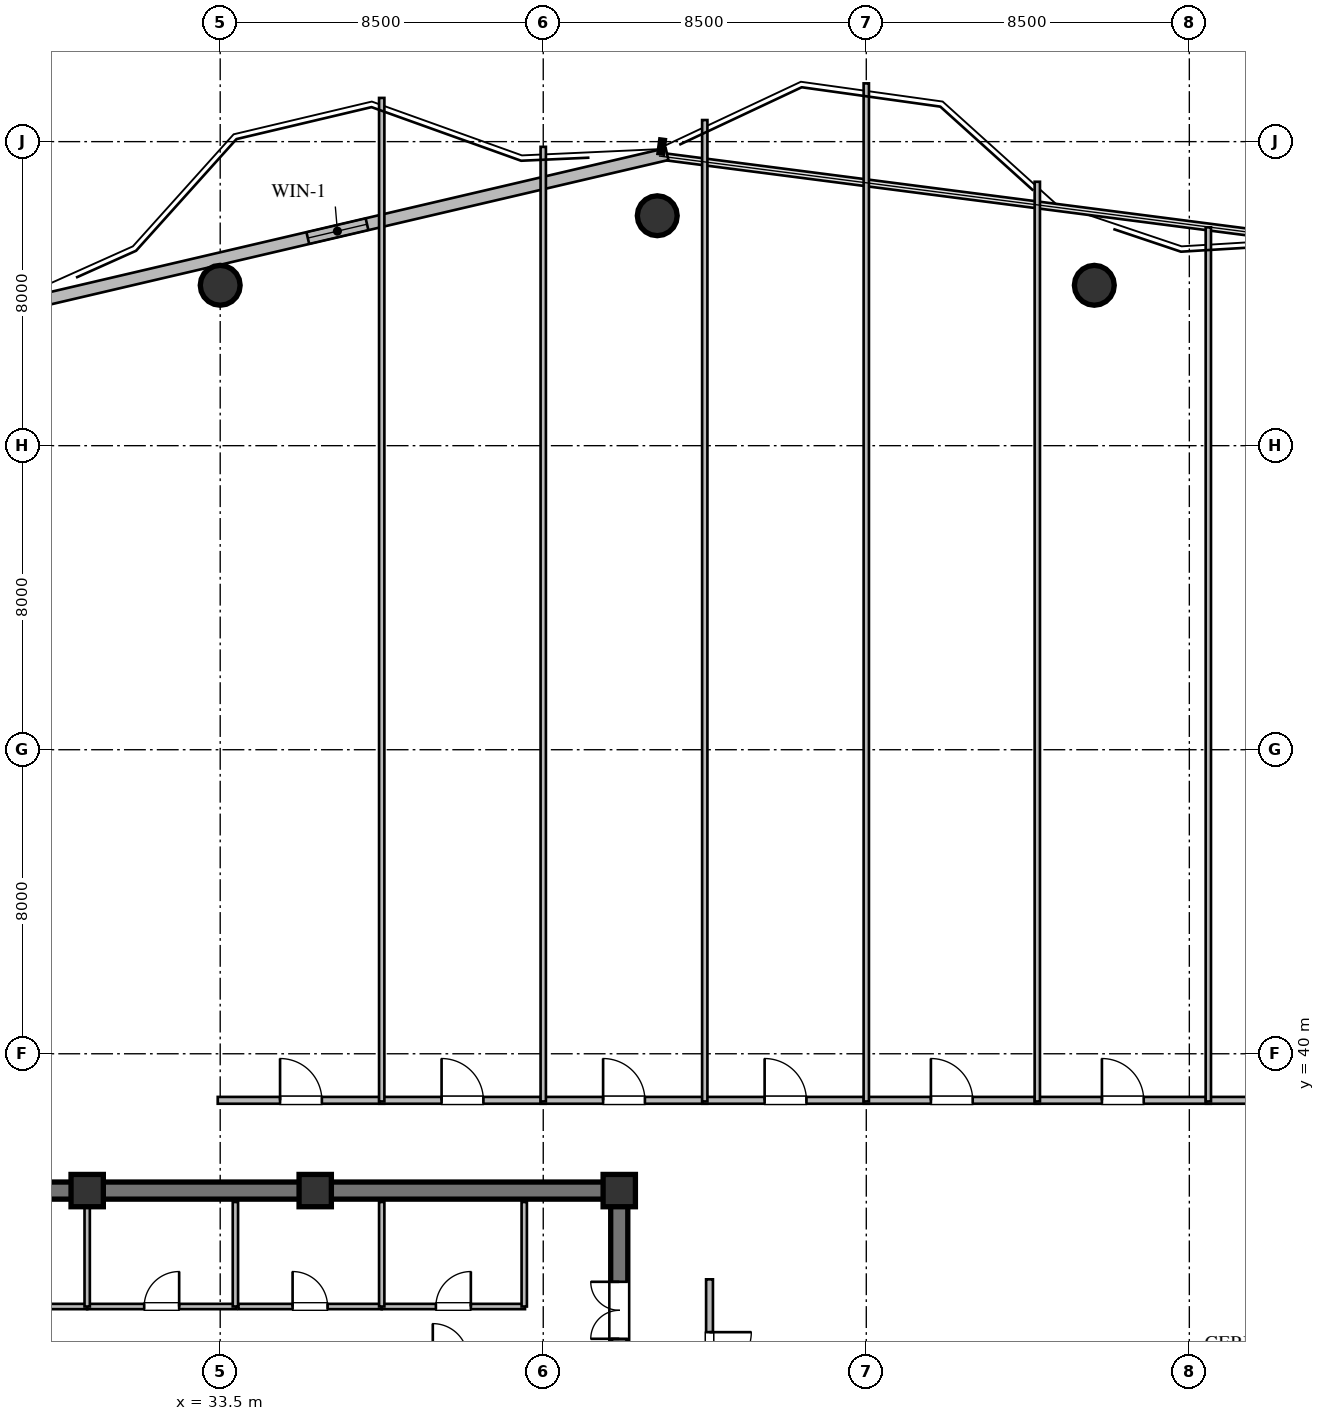
"""IFC4 building model, lengths in metres.
Left out: names, types, materials, properties, quantities, classifications, styles, units other than length and angle.
Written with IfcOpenShell. Run it as: python <this file> out.ifc"""

import sys

from ifc_helpers import new_model, si_unit, direction, frame, frame_2d, origin, origin_2d, place, context, subcontext, project, spatial, rectangle, circle, extrude, element, fill, save


model = new_model("IFC4")
c1 = context("Model", 3, precision=1e-05, world=origin(), true_north=direction((0.0, 1.0)))
c2 = subcontext(c1, "Body", "Model", "MODEL_VIEW")
j1 = project(units=[si_unit("LENGTHUNIT", "METRE"), si_unit("PLANEANGLEUNIT", "RADIAN")], contexts=[c1])
p1 = place(None, origin())
s1 = spatial("IfcSite", under=j1, at=p1, CompositionType="ELEMENT")
p2 = place(p1, origin())
s2 = spatial("IfcBuilding", under=s1, at=p2, CompositionType="ELEMENT")
p3 = place(p2, frame((0.0, 0.0, 220.8)))
s3 = spatial("IfcBuildingStorey", under=s2, at=p3, CompositionType="ELEMENT", Elevation=220.8)
p4 = place(p3, frame((21.775, 36.4, 0.0), z_axis=(0.0, 0.0, 1.0), x_axis=(1.0, 0.0, 0.0)))
e1 = element("IfcWall", 1, at=p4, inside=s3, PredefinedType="SHEAR", context=c2, shape_type="SweptSolid", body=[
    extrude(rectangle(XDim=22.45, YDim=0.45, at=frame_2d((11.225, 0.0))), origin(), (0.0, 0.0, 1.0), 3.36),
])
p5 = place(p3, frame((44.0, 23.825, 0.0), z_axis=(0.0, 0.0, 1.0), x_axis=(0.0, 1.0, 0.0)))
e2 = element("IfcWall", 2, at=p5, inside=s3, PredefinedType="SHEAR", context=c2, shape_type="SweptSolid", body=[
    extrude(rectangle(XDim=12.35, YDim=0.45, at=frame_2d((6.175, 0.0))), origin(), (0.0, 0.0, 1.0), 3.36),
])
p6 = place(p5, frame((8.675, 0.0, 0.0)))
e3 = element("IfcOpeningElement", 3, at=p6, cuts=e2, PredefinedType="OPENING", context=c2, shape_type="SweptSolid", body=[
    extrude(rectangle(XDim=1.5, YDim=2.15, at=frame_2d((0.75, 1.075))), frame((0.0, 0.235, 0.0), z_axis=(0.0, -1.0, 0.0), x_axis=(1.0, 0.0, 0.0)), (0.0, 0.0, 1.0), 0.47),
])
for number, where, z_axis, x_axis in (
    (4, (44.0, 36.4, 0.0), (0.0, 0.0, 1.0), (1.0, 0.0, 0.0)),
    (5, (36.0, 36.4, 0.0), (0.0, 0.0, 1.0), (1.0, 0.0, 0.0)),
    (6, (30.0, 36.4, 0.0), (0.0, 0.0, 1.0), (1.0, 0.0, 0.0)),
):
    element("IfcColumn", number, at=place(p3, frame(where, z_axis=z_axis, x_axis=x_axis)), inside=s3, PredefinedType="COLUMN", context=c2, shape_type="SweptSolid", body=[
        extrude(rectangle(XDim=0.85, YDim=0.85, at=origin_2d()), origin(), (0.0, 0.0, 1.0), 3.6),
    ])
for number, where, z_axis, x_axis in (
    (7, (56.5, 60.22, 0.0), (0.0, 0.0, 1.0), (1.0, 0.0, 0.0)),
    (8, (45.0, 62.05, 0.0), (0.0, 0.0, 1.0), (1.0, 0.0, 0.0)),
    (9, (33.5, 60.22, 0.0), (0.0, 0.0, 1.0), (1.0, 0.0, 0.0)),
):
    element("IfcColumn", number, at=place(p3, frame(where, z_axis=z_axis, x_axis=x_axis)), inside=s3, PredefinedType="COLUMN", context=c2, shape_type="SweptSolid", body=[
        extrude(circle(Radius=0.525, at=origin_2d()), origin(), (0.0, 0.0, 1.0), 3.6),
    ])
p7 = place(p3, frame((27.909, 59.617, 0.0), z_axis=(0.0, 0.0, 1.0), x_axis=(0.973753606594, 0.227604731158, 0.0)))
e10 = element("IfcWall", 10, at=p7, inside=s3, PredefinedType="STANDARD", context=c2, shape_type="SweptSolid", body=[
    extrude(rectangle(XDim=17.817, YDim=0.32, at=frame_2d((8.908, 0.0))), origin(), (0.0, 0.0, 1.0), 3.36),
])
p8 = place(p7, frame((8.109, 0.0, 1.05)))
e11 = element("IfcOpeningElement", 11, at=p8, cuts=e10, PredefinedType="OPENING", context=c2, shape_type="SweptSolid", body=[
    extrude(rectangle(XDim=1.6, YDim=1.5, at=frame_2d((0.8, 0.75))), frame((0.0, 0.17, 0.0), z_axis=(0.0, -1.0, 0.0), x_axis=(1.0, 0.0, 0.0)), (0.0, 0.0, 1.0), 0.34),
])
p9 = place(p3, frame((26.05, 33.35, 0.0), z_axis=(0.0, 0.0, 1.0), x_axis=(1.0, 0.0, 0.0)))
e12 = element("IfcWall", 12, at=p9, inside=s3, PredefinedType="PARTITIONING", context=c2, shape_type="SweptSolid", body=[
    extrude(rectangle(XDim=3.95, YDim=0.14, at=frame_2d((1.975, 0.0))), origin(), (0.0, 0.0, 1.0), 3.36),
])
p10 = place(p9, frame((1.515, 0.0, 0.0)))
e13 = element("IfcOpeningElement", 13, at=p10, cuts=e12, PredefinedType="OPENING", context=c2, shape_type="SweptSolid", body=[
    extrude(rectangle(XDim=0.92, YDim=2.1, at=frame_2d((0.46, 1.05))), frame((0.0, 0.08, 0.0), z_axis=(0.0, -1.0, 0.0), x_axis=(1.0, 0.0, 0.0)), (0.0, 0.0, 1.0), 0.16),
])
p11 = place(p3, frame((30.0, 33.35, 0.0), z_axis=(0.0, 0.0, 1.0), x_axis=(1.0, 0.0, 0.0)))
e14 = element("IfcWall", 14, at=p11, inside=s3, PredefinedType="PARTITIONING", context=c2, shape_type="SweptSolid", body=[
    extrude(rectangle(XDim=3.92, YDim=0.14, at=frame_2d((1.96, 0.0))), origin(), (0.0, 0.0, 1.0), 3.36),
])
p12 = place(p11, frame((1.5, 0.0, 0.0)))
e15 = element("IfcOpeningElement", 15, at=p12, cuts=e14, PredefinedType="OPENING", context=c2, shape_type="SweptSolid", body=[
    extrude(rectangle(XDim=0.92, YDim=2.1, at=frame_2d((0.46, 1.05))), frame((0.0, 0.08, 0.0), z_axis=(0.0, -1.0, 0.0), x_axis=(1.0, 0.0, 0.0)), (0.0, 0.0, 1.0), 0.16),
])
for number, where, z_axis, x_axis in (
    (16, (30.0, 33.35, 0.0), (0.0, 0.0, 1.0), (0.0, 1.0, 0.0)),
    (17, (33.9, 33.35, 0.0), (0.0, 0.0, 1.0), (0.0, 1.0, 0.0)),
):
    element("IfcWall", number, at=place(p3, frame(where, z_axis=z_axis, x_axis=x_axis)), inside=s3, PredefinedType="PARTITIONING", context=c2, shape_type="SweptSolid", body=[
        extrude(rectangle(XDim=2.75, YDim=0.14, at=frame_2d((1.375, 0.0))), origin(), (0.0, 0.0, 1.0), 3.36),
    ])
p13 = place(p3, frame((33.98, 33.35, 0.0), z_axis=(0.0, 0.0, 1.0), x_axis=(1.0, 0.0, 0.0)))
e18 = element("IfcWall", 18, at=p13, inside=s3, PredefinedType="PARTITIONING", context=c2, shape_type="SweptSolid", body=[
    extrude(rectangle(XDim=3.77, YDim=0.14, at=frame_2d((1.885, 0.0))), origin(), (0.0, 0.0, 1.0), 3.36),
])
p14 = place(p13, frame((1.425, 0.0, 0.0)))
e19 = element("IfcOpeningElement", 19, at=p14, cuts=e18, PredefinedType="OPENING", context=c2, shape_type="SweptSolid", body=[
    extrude(rectangle(XDim=0.92, YDim=2.1, at=frame_2d((0.46, 1.05))), frame((0.0, 0.08, 0.0), z_axis=(0.0, -1.0, 0.0), x_axis=(1.0, 0.0, 0.0)), (0.0, 0.0, 1.0), 0.16),
])
p15 = place(p3, frame((37.75, 33.35, 0.0), z_axis=(0.0, 0.0, 1.0), x_axis=(1.0, 0.0, 0.0)))
e20 = element("IfcWall", 20, at=p15, inside=s3, PredefinedType="PARTITIONING", context=c2, shape_type="SweptSolid", body=[
    extrude(rectangle(XDim=3.77, YDim=0.14, at=frame_2d((1.885, 0.0))), origin(), (0.0, 0.0, 1.0), 3.36),
])
p16 = place(p15, frame((1.425, 0.0, 0.0)))
e21 = element("IfcOpeningElement", 21, at=p16, cuts=e20, PredefinedType="OPENING", context=c2, shape_type="SweptSolid", body=[
    extrude(rectangle(XDim=0.92, YDim=2.1, at=frame_2d((0.46, 1.05))), frame((0.0, 0.08, 0.0), z_axis=(0.0, -1.0, 0.0), x_axis=(1.0, 0.0, 0.0)), (0.0, 0.0, 1.0), 0.16),
])
for number, where, z_axis, x_axis in (
    (22, (37.75, 33.35, 0.0), (0.0, 0.0, 1.0), (0.0, 1.0, 0.0)),
    (23, (41.5, 33.35, 0.0), (0.0, 0.0, 1.0), (0.0, 1.0, 0.0)),
):
    element("IfcWall", number, at=place(p3, frame(where, z_axis=z_axis, x_axis=x_axis)), inside=s3, PredefinedType="PARTITIONING", context=c2, shape_type="SweptSolid", body=[
        extrude(rectangle(XDim=2.75, YDim=0.14, at=frame_2d((1.375, 0.0))), origin(), (0.0, 0.0, 1.0), 3.36),
    ])
p17 = place(p3, frame((33.435, 38.775, 0.0), z_axis=(0.0, 0.0, 1.0), x_axis=(1.0, 0.0, 0.0)))
e24 = element("IfcWall", 24, at=p17, inside=s3, PredefinedType="PARTITIONING", context=c2, shape_type="SweptSolid", body=[
    extrude(rectangle(XDim=4.38, YDim=0.18, at=frame_2d((2.19, 0.0))), origin(), (0.0, 0.0, 1.0), 3.36),
])
p18 = place(p17, frame((1.64, 0.0, 0.0)))
e25 = element("IfcOpeningElement", 25, at=p18, cuts=e24, PredefinedType="OPENING", context=c2, shape_type="SweptSolid", body=[
    extrude(rectangle(XDim=1.1, YDim=2.1, at=frame_2d((0.55, 1.05))), frame((0.0, 0.1, 0.0), z_axis=(0.0, -1.0, 0.0), x_axis=(1.0, 0.0, 0.0)), (0.0, 0.0, 1.0), 0.2),
])
p19 = place(p3, frame((37.685, 38.775, 0.0), z_axis=(0.0, 0.0, 1.0), x_axis=(1.0, 0.0, 0.0)))
e26 = element("IfcWall", 26, at=p19, inside=s3, PredefinedType="PARTITIONING", context=c2, shape_type="SweptSolid", body=[
    extrude(rectangle(XDim=4.38, YDim=0.18, at=frame_2d((2.19, 0.0))), origin(), (0.0, 0.0, 1.0), 3.36),
])
p20 = place(p19, frame((1.64, 0.0, 0.0)))
e27 = element("IfcOpeningElement", 27, at=p20, cuts=e26, PredefinedType="OPENING", context=c2, shape_type="SweptSolid", body=[
    extrude(rectangle(XDim=1.1, YDim=2.1, at=frame_2d((0.55, 1.05))), frame((0.0, 0.1, 0.0), z_axis=(0.0, -1.0, 0.0), x_axis=(1.0, 0.0, 0.0)), (0.0, 0.0, 1.0), 0.2),
])
p21 = place(p3, frame((41.935, 38.775, 0.0), z_axis=(0.0, 0.0, 1.0), x_axis=(1.0, 0.0, 0.0)))
e28 = element("IfcWall", 28, at=p21, inside=s3, PredefinedType="PARTITIONING", context=c2, shape_type="SweptSolid", body=[
    extrude(rectangle(XDim=4.38, YDim=0.18, at=frame_2d((2.19, 0.0))), origin(), (0.0, 0.0, 1.0), 3.36),
])
p22 = place(p21, frame((1.64, 0.0, 0.0)))
e29 = element("IfcOpeningElement", 29, at=p22, cuts=e28, PredefinedType="OPENING", context=c2, shape_type="SweptSolid", body=[
    extrude(rectangle(XDim=1.1, YDim=2.1, at=frame_2d((0.55, 1.05))), frame((0.0, 0.1, 0.0), z_axis=(0.0, -1.0, 0.0), x_axis=(1.0, 0.0, 0.0)), (0.0, 0.0, 1.0), 0.2),
])
p23 = place(p3, frame((46.185, 38.775, 0.0), z_axis=(0.0, 0.0, 1.0), x_axis=(1.0, 0.0, 0.0)))
e30 = element("IfcWall", 30, at=p23, inside=s3, PredefinedType="PARTITIONING", context=c2, shape_type="SweptSolid", body=[
    extrude(rectangle(XDim=4.38, YDim=0.18, at=frame_2d((2.19, 0.0))), origin(), (0.0, 0.0, 1.0), 3.36),
])
p24 = place(p23, frame((1.64, 0.0, 0.0)))
e31 = element("IfcOpeningElement", 31, at=p24, cuts=e30, PredefinedType="OPENING", context=c2, shape_type="SweptSolid", body=[
    extrude(rectangle(XDim=1.1, YDim=2.1, at=frame_2d((0.55, 1.05))), frame((0.0, 0.1, 0.0), z_axis=(0.0, -1.0, 0.0), x_axis=(1.0, 0.0, 0.0)), (0.0, 0.0, 1.0), 0.2),
])
p25 = place(p3, frame((50.435, 38.775, 0.0), z_axis=(0.0, 0.0, 1.0), x_axis=(1.0, 0.0, 0.0)))
e32 = element("IfcWall", 32, at=p25, inside=s3, PredefinedType="PARTITIONING", context=c2, shape_type="SweptSolid", body=[
    extrude(rectangle(XDim=4.63, YDim=0.18, at=frame_2d((2.315, 0.0))), origin(), (0.0, 0.0, 1.0), 3.36),
])
p26 = place(p25, frame((1.765, 0.0, 0.0)))
e33 = element("IfcOpeningElement", 33, at=p26, cuts=e32, PredefinedType="OPENING", context=c2, shape_type="SweptSolid", body=[
    extrude(rectangle(XDim=1.1, YDim=2.1, at=frame_2d((0.55, 1.05))), frame((0.0, 0.1, 0.0), z_axis=(0.0, -1.0, 0.0), x_axis=(1.0, 0.0, 0.0)), (0.0, 0.0, 1.0), 0.2),
])
p27 = place(p3, frame((54.935, 38.775, 0.0), z_axis=(0.0, 0.0, 1.0), x_axis=(1.0, 0.0, 0.0)))
e34 = element("IfcWall", 34, at=p27, inside=s3, PredefinedType="PARTITIONING", context=c2, shape_type="SweptSolid", body=[
    extrude(rectangle(XDim=4.63, YDim=0.18, at=frame_2d((2.315, 0.0))), origin(), (0.0, 0.0, 1.0), 3.36),
])
p28 = place(p27, frame((1.765, 0.0, 0.0)))
e35 = element("IfcOpeningElement", 35, at=p28, cuts=e34, PredefinedType="OPENING", context=c2, shape_type="SweptSolid", body=[
    extrude(rectangle(XDim=1.1, YDim=2.1, at=frame_2d((0.55, 1.05))), frame((0.0, 0.1, 0.0), z_axis=(0.0, -1.0, 0.0), x_axis=(1.0, 0.0, 0.0)), (0.0, 0.0, 1.0), 0.2),
])
p29 = place(p3, frame((59.435, 38.775, 0.0), z_axis=(0.0, 0.0, 1.0), x_axis=(1.0, 0.0, 0.0)))
e36 = element("IfcWall", 36, at=p29, inside=s3, PredefinedType="PARTITIONING", context=c2, shape_type="SweptSolid", body=[
    extrude(rectangle(XDim=5.095, YDim=0.18, at=frame_2d((2.547, 0.0))), origin(), (0.0, 0.0, 1.0), 3.36),
])
p30 = place(p29, frame((1.997, 0.0, 0.0)))
e37 = element("IfcOpeningElement", 37, at=p30, cuts=e36, PredefinedType="OPENING", context=c2, shape_type="SweptSolid", body=[
    extrude(rectangle(XDim=1.1, YDim=2.1, at=frame_2d((0.55, 1.05))), frame((0.0, 0.1, 0.0), z_axis=(0.0, -1.0, 0.0), x_axis=(1.0, 0.0, 0.0)), (0.0, 0.0, 1.0), 0.2),
])
p31 = place(p3, frame((46.375, 34.065, 0.0), z_axis=(0.0, 0.0, 1.0), x_axis=(0.0, -1.0, 0.0)))
e38 = element("IfcWall", 38, at=p31, inside=s3, PredefinedType="PARTITIONING", context=c2, shape_type="SweptSolid", body=[
    extrude(rectangle(XDim=3.88, YDim=0.18, at=frame_2d((1.94, 0.0))), origin(), (0.0, 0.0, 1.0), 3.36),
])
p32 = place(p31, frame((1.39, 0.0, 0.0)))
e39 = element("IfcOpeningElement", 39, at=p32, cuts=e38, PredefinedType="OPENING", context=c2, shape_type="SweptSolid", body=[
    extrude(rectangle(XDim=1.1, YDim=2.1, at=frame_2d((0.55, 1.05))), frame((0.0, 0.1, 0.0), z_axis=(0.0, -1.0, 0.0), x_axis=(1.0, 0.0, 0.0)), (0.0, 0.0, 1.0), 0.2),
])
p33 = place(p3, frame((37.75, 65.15, 0.0), z_axis=(0.0, 0.0, 1.0), x_axis=(0.0, -1.0, 0.0)))
e40 = element("IfcWall", 40, at=p33, inside=s3, PredefinedType="PARTITIONING", context=c2, shape_type="SweptSolid", body=[
    extrude(rectangle(XDim=26.405, YDim=0.14, at=frame_2d((13.202, 0.0))), origin(), (0.0, 0.0, 1.0), 3.36),
])
p34 = place(p3, frame((42.0, 63.863, 0.0), z_axis=(0.0, 0.0, 1.0), x_axis=(0.0, -1.0, 0.0)))
e41 = element("IfcWall", 41, at=p34, inside=s3, PredefinedType="PARTITIONING", context=c2, shape_type="SweptSolid", body=[
    extrude(rectangle(XDim=25.118, YDim=0.14, at=frame_2d((12.559, 0.0))), origin(), (0.0, 0.0, 1.0), 3.36),
])
p35 = place(p3, frame((46.25, 64.568, 0.0), z_axis=(0.0, 0.0, 1.0), x_axis=(0.0, -1.0, 0.0)))
e42 = element("IfcWall", 42, at=p35, inside=s3, PredefinedType="PARTITIONING", context=c2, shape_type="SweptSolid", body=[
    extrude(rectangle(XDim=25.823, YDim=0.14, at=frame_2d((12.912, 0.0))), origin(), (0.0, 0.0, 1.0), 3.36),
])
p36 = place(p3, frame((50.5, 65.533, 0.0), z_axis=(0.0, 0.0, 1.0), x_axis=(0.0, -1.0, 0.0)))
e43 = element("IfcWall", 43, at=p36, inside=s3, PredefinedType="PARTITIONING", context=c2, shape_type="SweptSolid", body=[
    extrude(rectangle(XDim=26.788, YDim=0.14, at=frame_2d((13.394, 0.0))), origin(), (0.0, 0.0, 1.0), 3.36),
])
p37 = place(p3, frame((55.0, 62.944, 0.0), z_axis=(0.0, 0.0, 1.0), x_axis=(0.0, -1.0, 0.0)))
e44 = element("IfcWall", 44, at=p37, inside=s3, PredefinedType="PARTITIONING", context=c2, shape_type="SweptSolid", body=[
    extrude(rectangle(XDim=24.199, YDim=0.14, at=frame_2d((12.1, 0.0))), origin(), (0.0, 0.0, 1.0), 3.36),
])
p38 = place(p3, frame((59.5, 61.745, 0.0), z_axis=(0.0, 0.0, 1.0), x_axis=(0.0, -1.0, 0.0)))
e45 = element("IfcWall", 45, at=p38, inside=s3, PredefinedType="PARTITIONING", context=c2, shape_type="SweptSolid", body=[
    extrude(rectangle(XDim=23.0, YDim=0.14, at=frame_2d((11.5, 0.0))), origin(), (0.0, 0.0, 1.0), 2.996),
])
p39 = place(p8, origin())
e46 = element("IfcWindow", 46, at=p39, inside=s3, PartitioningType="SINGLE_PANEL", PredefinedType="WINDOW", context=c2, shape_type="SweptSolid", body=[
    extrude(rectangle(XDim=1.6, YDim=1.5, at=frame_2d((0.8, 0.75))), frame((0.0, 0.03, 0.0), z_axis=(0.0, -1.0, 0.0), x_axis=(1.0, 0.0, 0.0)), (0.0, 0.0, 1.0), 0.06),
])
fill(e11, e46)
p40 = place(p6, origin())
e47 = element("IfcDoor", 47, at=p40, inside=s3, OperationType="DOUBLE_DOOR_SINGLE_SWING", PredefinedType="DOOR", context=c2, shape_type="SweptSolid", body=[
    extrude(rectangle(XDim=1.5, YDim=2.15, at=frame_2d((0.75, 1.075))), frame((0.0, 0.025, 0.0), z_axis=(0.0, -1.0, 0.0), x_axis=(1.0, 0.0, 0.0)), (0.0, 0.0, 1.0), 0.05),
])
fill(e3, e47)
p41 = place(p12, origin())
e48 = element("IfcDoor", 48, at=p41, inside=s3, OperationType="SINGLE_SWING_RIGHT", PredefinedType="DOOR", context=c2, shape_type="SweptSolid", body=[
    extrude(rectangle(XDim=0.92, YDim=2.1, at=frame_2d((0.46, 1.05))), frame((0.0, 0.025, 0.0), z_axis=(0.0, -1.0, 0.0), x_axis=(1.0, 0.0, 0.0)), (0.0, 0.0, 1.0), 0.05),
])
fill(e15, e48)
p42 = place(p14, origin())
e49 = element("IfcDoor", 49, at=p42, inside=s3, OperationType="SINGLE_SWING_LEFT", PredefinedType="DOOR", context=c2, shape_type="SweptSolid", body=[
    extrude(rectangle(XDim=0.92, YDim=2.1, at=frame_2d((0.46, 1.05))), frame((0.0, 0.025, 0.0), z_axis=(0.0, -1.0, 0.0), x_axis=(1.0, 0.0, 0.0)), (0.0, 0.0, 1.0), 0.05),
])
fill(e19, e49)
p43 = place(p16, origin())
e50 = element("IfcDoor", 50, at=p43, inside=s3, OperationType="SINGLE_SWING_RIGHT", PredefinedType="DOOR", context=c2, shape_type="SweptSolid", body=[
    extrude(rectangle(XDim=0.92, YDim=2.1, at=frame_2d((0.46, 1.05))), frame((0.0, 0.025, 0.0), z_axis=(0.0, -1.0, 0.0), x_axis=(1.0, 0.0, 0.0)), (0.0, 0.0, 1.0), 0.05),
])
fill(e21, e50)
p44 = place(p18, origin())
e51 = element("IfcDoor", 51, at=p44, inside=s3, OperationType="SINGLE_SWING_LEFT", PredefinedType="DOOR", context=c2, shape_type="SweptSolid", body=[
    extrude(rectangle(XDim=1.1, YDim=2.1, at=frame_2d((0.55, 1.05))), frame((0.0, 0.025, 0.0), z_axis=(0.0, -1.0, 0.0), x_axis=(1.0, 0.0, 0.0)), (0.0, 0.0, 1.0), 0.05),
])
fill(e25, e51)
p45 = place(p20, origin())
e52 = element("IfcDoor", 52, at=p45, inside=s3, OperationType="SINGLE_SWING_LEFT", PredefinedType="DOOR", context=c2, shape_type="SweptSolid", body=[
    extrude(rectangle(XDim=1.1, YDim=2.1, at=frame_2d((0.55, 1.05))), frame((0.0, 0.025, 0.0), z_axis=(0.0, -1.0, 0.0), x_axis=(1.0, 0.0, 0.0)), (0.0, 0.0, 1.0), 0.05),
])
fill(e27, e52)
p46 = place(p22, origin())
e53 = element("IfcDoor", 53, at=p46, inside=s3, OperationType="SINGLE_SWING_LEFT", PredefinedType="DOOR", context=c2, shape_type="SweptSolid", body=[
    extrude(rectangle(XDim=1.1, YDim=2.1, at=frame_2d((0.55, 1.05))), frame((0.0, 0.025, 0.0), z_axis=(0.0, -1.0, 0.0), x_axis=(1.0, 0.0, 0.0)), (0.0, 0.0, 1.0), 0.05),
])
fill(e29, e53)
p47 = place(p24, origin())
e54 = element("IfcDoor", 54, at=p47, inside=s3, OperationType="SINGLE_SWING_LEFT", PredefinedType="DOOR", context=c2, shape_type="SweptSolid", body=[
    extrude(rectangle(XDim=1.1, YDim=2.1, at=frame_2d((0.55, 1.05))), frame((0.0, 0.025, 0.0), z_axis=(0.0, -1.0, 0.0), x_axis=(1.0, 0.0, 0.0)), (0.0, 0.0, 1.0), 0.05),
])
fill(e31, e54)
p48 = place(p26, origin())
e55 = element("IfcDoor", 55, at=p48, inside=s3, OperationType="SINGLE_SWING_LEFT", PredefinedType="DOOR", context=c2, shape_type="SweptSolid", body=[
    extrude(rectangle(XDim=1.1, YDim=2.1, at=frame_2d((0.55, 1.05))), frame((0.0, 0.025, 0.0), z_axis=(0.0, -1.0, 0.0), x_axis=(1.0, 0.0, 0.0)), (0.0, 0.0, 1.0), 0.05),
])
fill(e33, e55)
p49 = place(p28, origin())
e56 = element("IfcDoor", 56, at=p49, inside=s3, OperationType="SINGLE_SWING_LEFT", PredefinedType="DOOR", context=c2, shape_type="SweptSolid", body=[
    extrude(rectangle(XDim=1.1, YDim=2.1, at=frame_2d((0.55, 1.05))), frame((0.0, 0.025, 0.0), z_axis=(0.0, -1.0, 0.0), x_axis=(1.0, 0.0, 0.0)), (0.0, 0.0, 1.0), 0.05),
])
fill(e35, e56)
p50 = place(p32, origin())
e57 = element("IfcDoor", 57, at=p50, inside=s3, OperationType="SINGLE_SWING_LEFT", PredefinedType="DOOR", context=c2, shape_type="SweptSolid", body=[
    extrude(rectangle(XDim=1.1, YDim=2.1, at=frame_2d((0.55, 1.05))), frame((0.0, 0.025, 0.0), z_axis=(0.0, -1.0, 0.0), x_axis=(1.0, 0.0, 0.0)), (0.0, 0.0, 1.0), 0.05),
])
fill(e39, e57)
save(model, sys.argv[1])
